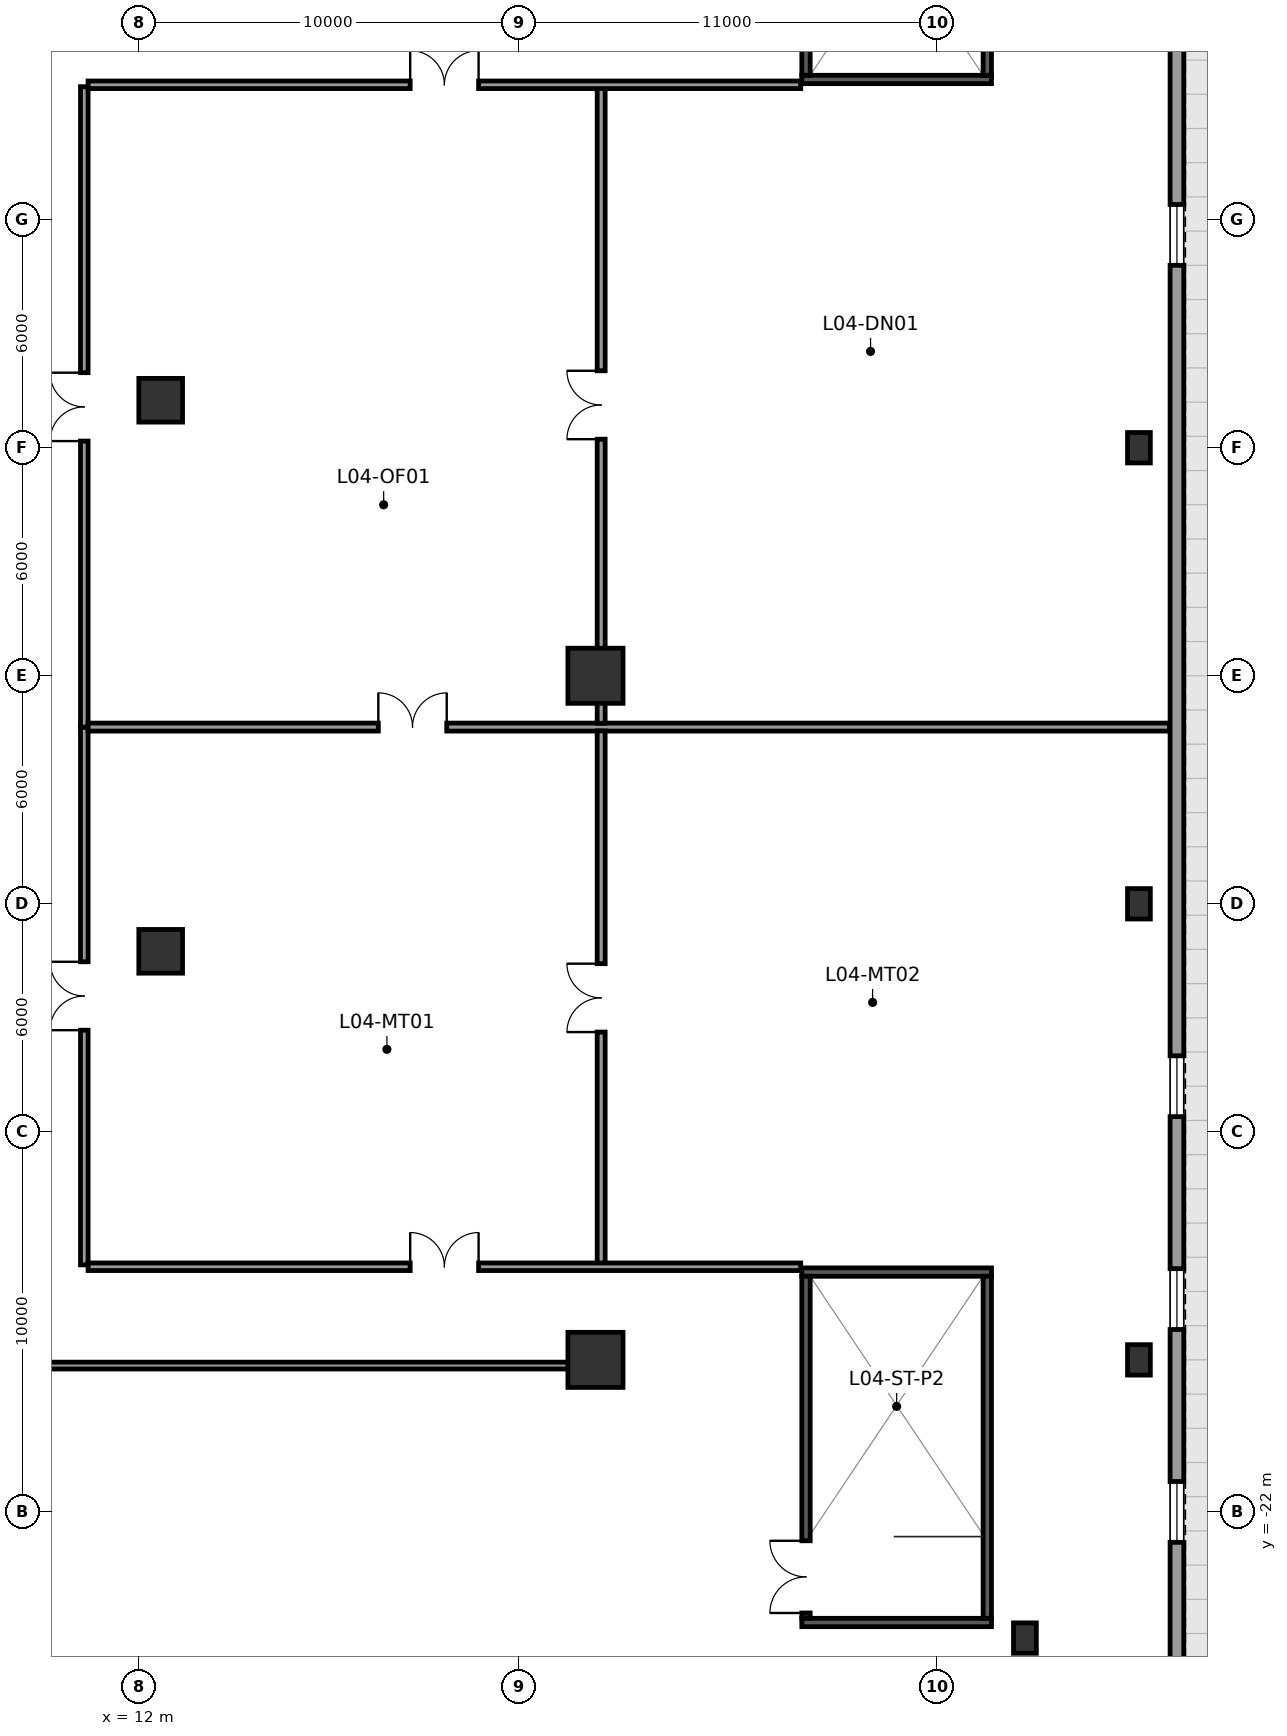
"""IFC4 building model, lengths in metres.
Left out: names, types, materials, properties, quantities, classifications, styles, units other than length and angle.
Written with IfcOpenShell. Run it as: python <this file> out.ifc"""

import sys

from ifc_helpers import new_model, si_unit, direction, frame, frame_2d, origin, origin_2d, place, context, subcontext, project, spatial, rectangle, hollow_rectangle, extrude, element, fill, save


model = new_model("IFC4")
c1 = context("Model", 3, precision=1e-05, world=origin(), true_north=direction((0.0, 1.0)))
c2 = subcontext(c1, "Body", "Model", "MODEL_VIEW")
j1 = project(units=[si_unit("LENGTHUNIT", "METRE"), si_unit("PLANEANGLEUNIT", "RADIAN")], contexts=[c1])
p1 = place(None, origin())
s1 = spatial("IfcSite", under=j1, at=p1, CompositionType="ELEMENT")
p2 = place(p1, origin())
s2 = spatial("IfcBuilding", under=s1, at=p2, CompositionType="ELEMENT")
p3 = place(p2, frame((0.0, 0.0, 23.5)))
s3 = spatial("IfcBuildingStorey", under=s2, at=p3, CompositionType="ELEMENT", Elevation=23.5)
for number, where, z_axis, x_axis in (
    (1, (12.56, -7.25, 0.0), (0.0, 0.0, 1.0), (1.0, 0.0, 0.0)),
    (2, (12.56, 7.25, 0.0), (0.0, 0.0, 1.0), (1.0, 0.0, 0.0)),
):
    element("IfcColumn", number, at=place(p3, frame(where, z_axis=z_axis, x_axis=x_axis)), inside=s3, PredefinedType="COLUMN", context=c2, shape_type="SweptSolid", body=[
        extrude(rectangle(XDim=1.15, YDim=1.15, at=origin_2d()), origin(), (0.0, 0.0, 1.0), 5.5),
    ])
for number, where, z_axis, x_axis in (
    (3, (24.0, -18.0, 0.0), (0.0, 0.0, 1.0), (1.0, 0.0, 0.0)),
    (4, (24.0, 0.0, 0.0), (0.0, 0.0, 1.0), (1.0, 0.0, 0.0)),
):
    element("IfcColumn", number, at=place(p3, frame(where, z_axis=z_axis, x_axis=x_axis)), inside=s3, PredefinedType="COLUMN", context=c2, shape_type="SweptSolid", body=[
        extrude(rectangle(XDim=1.45, YDim=1.45, at=origin_2d()), origin(), (0.0, 0.0, 1.0), 5.5),
    ])
for number, where, z_axis, x_axis in (
    (5, (38.3, -18.0, 0.0), (0.0, 0.0, 1.0), (1.0, 0.0, 0.0)),
    (6, (38.3, -6.0, 0.0), (0.0, 0.0, 1.0), (1.0, 0.0, 0.0)),
    (7, (38.3, 6.0, 0.0), (0.0, 0.0, 1.0), (1.0, 0.0, 0.0)),
):
    element("IfcColumn", number, at=place(p3, frame(where, z_axis=z_axis, x_axis=x_axis)), inside=s3, PredefinedType="COLUMN", context=c2, shape_type="SweptSolid", body=[
        extrude(hollow_rectangle(XDim=0.6, YDim=0.8, WallThickness=0.05, at=origin_2d()), origin(), (0.0, 0.0, 1.0), 5.5),
    ])
p4 = place(p3, frame((35.3, -25.32, 0.0), z_axis=(0.0, 0.0, 1.0), x_axis=(1.0, 0.0, 0.0)))
e8 = element("IfcColumn", 8, at=p4, inside=s3, PredefinedType="COLUMN", context=c2, shape_type="SweptSolid", body=[
    extrude(hollow_rectangle(XDim=0.6, YDim=0.8, WallThickness=0.05, at=origin_2d()), origin(), (0.0, 0.0, 1.0), 5.15),
])
p5 = place(p3, frame((39.3, 28.4, 0.0), z_axis=(0.0, 0.0, 1.0), x_axis=(0.0, -1.0, 0.0)))
e9 = element("IfcWall", 9, at=p5, inside=s3, PredefinedType="STANDARD", context=c2, shape_type="SweptSolid", body=[
    extrude(rectangle(XDim=56.8, YDim=0.36, at=frame_2d((28.4, 0.0))), origin(), (0.0, 0.0, 1.0), 5.15),
])
p6 = place(p5, frame((4.8, 0.0, 0.9)))
e10 = element("IfcOpeningElement", 10, at=p6, cuts=e9, PredefinedType="OPENING", context=c2, shape_type="SweptSolid", body=[
    extrude(rectangle(XDim=1.6, YDim=2.6, at=frame_2d((0.8, 1.3))), frame((0.0, 0.19, 0.0), z_axis=(0.0, -1.0, 0.0), x_axis=(1.0, 0.0, 0.0)), (0.0, 0.0, 1.0), 0.38),
])
p7 = place(p5, frame((16.0, 0.0, 0.9)))
e11 = element("IfcOpeningElement", 11, at=p7, cuts=e9, PredefinedType="OPENING", context=c2, shape_type="SweptSolid", body=[
    extrude(rectangle(XDim=1.6, YDim=2.6, at=frame_2d((0.8, 1.3))), frame((0.0, 0.19, 0.0), z_axis=(0.0, -1.0, 0.0), x_axis=(1.0, 0.0, 0.0)), (0.0, 0.0, 1.0), 0.38),
])
p8 = place(p5, frame((38.4, 0.0, 0.9)))
e12 = element("IfcOpeningElement", 12, at=p8, cuts=e9, PredefinedType="OPENING", context=c2, shape_type="SweptSolid", body=[
    extrude(rectangle(XDim=1.6, YDim=2.6, at=frame_2d((0.8, 1.3))), frame((0.0, 0.19, 0.0), z_axis=(0.0, -1.0, 0.0), x_axis=(1.0, 0.0, 0.0)), (0.0, 0.0, 1.0), 0.38),
])
p9 = place(p5, frame((44.0, 0.0, 0.9)))
e13 = element("IfcOpeningElement", 13, at=p9, cuts=e9, PredefinedType="OPENING", context=c2, shape_type="SweptSolid", body=[
    extrude(rectangle(XDim=1.6, YDim=2.6, at=frame_2d((0.8, 1.3))), frame((0.0, 0.19, 0.0), z_axis=(0.0, -1.0, 0.0), x_axis=(1.0, 0.0, 0.0)), (0.0, 0.0, 1.0), 0.38),
])
p10 = place(p5, frame((49.6, 0.0, 0.9)))
e14 = element("IfcOpeningElement", 14, at=p10, cuts=e9, PredefinedType="OPENING", context=c2, shape_type="SweptSolid", body=[
    extrude(rectangle(XDim=1.6, YDim=2.6, at=frame_2d((0.8, 1.3))), frame((0.0, 0.19, 0.0), z_axis=(0.0, -1.0, 0.0), x_axis=(1.0, 0.0, 0.0)), (0.0, 0.0, 1.0), 0.38),
])
for number, where, z_axis, x_axis in (
    (15, (29.43, -24.91, 0.0), (0.0, 0.0, 1.0), (1.0, 0.0, 0.0)),
    (16, (29.43, -15.69, 0.0), (0.0, 0.0, 1.0), (1.0, 0.0, 0.0)),
):
    element("IfcWall", number, at=place(p3, frame(where, z_axis=z_axis, x_axis=x_axis)), inside=s3, PredefinedType="SHEAR", context=c2, shape_type="SweptSolid", body=[
        extrude(rectangle(XDim=4.99, YDim=0.22, at=frame_2d((2.495, 0.0))), origin(), (0.0, 0.0, 1.0), 5.15),
    ])
p11 = place(p3, frame((29.54, -24.8, 0.0), z_axis=(0.0, 0.0, 1.0), x_axis=(0.0, 1.0, 0.0)))
e17 = element("IfcWall", 17, at=p11, inside=s3, PredefinedType="SHEAR", context=c2, shape_type="SweptSolid", body=[
    extrude(rectangle(XDim=9.0, YDim=0.22, at=frame_2d((4.5, 0.0))), origin(), (0.0, 0.0, 1.0), 5.15),
])
p12 = place(p11, frame((0.14, 0.0, 0.0)))
e18 = element("IfcOpeningElement", 18, at=p12, cuts=e17, PredefinedType="OPENING", context=c2, shape_type="SweptSolid", body=[
    extrude(rectangle(XDim=1.9, YDim=2.2, at=frame_2d((0.95, 1.1))), frame((0.0, 0.12, 0.0), z_axis=(0.0, -1.0, 0.0), x_axis=(1.0, 0.0, 0.0)), (0.0, 0.0, 1.0), 0.24),
])
p13 = place(p3, frame((34.31, -24.8, 0.0), z_axis=(0.0, 0.0, 1.0), x_axis=(0.0, 1.0, 0.0)))
e19 = element("IfcWall", 19, at=p13, inside=s3, PredefinedType="SHEAR", context=c2, shape_type="SweptSolid", body=[
    extrude(rectangle(XDim=9.0, YDim=0.22, at=frame_2d((4.5, 0.0))), origin(), (0.0, 0.0, 1.0), 5.15),
])
p14 = place(p3, frame((29.43, 15.69, 0.0), z_axis=(0.0, 0.0, 1.0), x_axis=(1.0, 0.0, 0.0)))
e20 = element("IfcWall", 20, at=p14, inside=s3, PredefinedType="SHEAR", context=c2, shape_type="SweptSolid", body=[
    extrude(rectangle(XDim=4.99, YDim=0.22, at=frame_2d((2.495, 0.0))), origin(), (0.0, 0.0, 1.0), 5.15),
])
p15 = place(p3, frame((29.54, 15.8, 0.0), z_axis=(0.0, 0.0, 1.0), x_axis=(0.0, 1.0, 0.0)))
e21 = element("IfcWall", 21, at=p15, inside=s3, PredefinedType="SHEAR", context=c2, shape_type="SweptSolid", body=[
    extrude(rectangle(XDim=9.0, YDim=0.22, at=frame_2d((4.5, 0.0))), origin(), (0.0, 0.0, 1.0), 5.15),
])
p16 = place(p15, frame((6.96, 0.0, 0.0)))
e22 = element("IfcOpeningElement", 22, at=p16, cuts=e21, PredefinedType="OPENING", context=c2, shape_type="SweptSolid", body=[
    extrude(rectangle(XDim=1.9, YDim=2.2, at=frame_2d((0.95, 1.1))), frame((0.0, 0.12, 0.0), z_axis=(0.0, -1.0, 0.0), x_axis=(1.0, 0.0, 0.0)), (0.0, 0.0, 1.0), 0.24),
])
p17 = place(p3, frame((34.31, 15.8, 0.0), z_axis=(0.0, 0.0, 1.0), x_axis=(0.0, 1.0, 0.0)))
e23 = element("IfcWall", 23, at=p17, inside=s3, PredefinedType="SHEAR", context=c2, shape_type="SweptSolid", body=[
    extrude(rectangle(XDim=9.0, YDim=0.22, at=frame_2d((4.5, 0.0))), origin(), (0.0, 0.0, 1.0), 5.15),
])
p18 = place(p3, frame((10.55, -15.5, 0.0), z_axis=(0.0, 0.0, 1.0), x_axis=(0.0, 1.0, 0.0)))
e24 = element("IfcWall", 24, at=p18, inside=s3, PredefinedType="PARTITIONING", context=c2, shape_type="SweptSolid", body=[
    extrude(rectangle(XDim=14.15, YDim=0.2, at=frame_2d((7.075, 0.0))), origin(), (0.0, 0.0, 1.0), 5.15),
])
p19 = place(p18, frame((6.175, 0.0, 0.0)))
e25 = element("IfcOpeningElement", 25, at=p19, cuts=e24, PredefinedType="OPENING", context=c2, shape_type="SweptSolid", body=[
    extrude(rectangle(XDim=1.8, YDim=2.2, at=frame_2d((0.9, 1.1))), frame((0.0, 0.11, 0.0), z_axis=(0.0, -1.0, 0.0), x_axis=(1.0, 0.0, 0.0)), (0.0, 0.0, 1.0), 0.22),
])
p20 = place(p3, frame((10.55, -1.35, 0.0), z_axis=(0.0, 0.0, 1.0), x_axis=(0.0, 1.0, 0.0)))
e26 = element("IfcWall", 26, at=p20, inside=s3, PredefinedType="PARTITIONING", context=c2, shape_type="SweptSolid", body=[
    extrude(rectangle(XDim=16.85, YDim=0.2, at=frame_2d((8.425, 0.0))), origin(), (0.0, 0.0, 1.0), 5.15),
])
p21 = place(p20, frame((7.525, 0.0, 0.0)))
e27 = element("IfcOpeningElement", 27, at=p21, cuts=e26, PredefinedType="OPENING", context=c2, shape_type="SweptSolid", body=[
    extrude(rectangle(XDim=1.8, YDim=2.2, at=frame_2d((0.9, 1.1))), frame((0.0, 0.11, 0.0), z_axis=(0.0, -1.0, 0.0), x_axis=(1.0, 0.0, 0.0)), (0.0, 0.0, 1.0), 0.22),
])
p22 = place(p3, frame((10.65, -1.35, 0.0), z_axis=(0.0, 0.0, 1.0), x_axis=(1.0, 0.0, 0.0)))
e28 = element("IfcWall", 28, at=p22, inside=s3, PredefinedType="MOVABLE", context=c2, shape_type="SweptSolid", body=[
    extrude(rectangle(XDim=28.455, YDim=0.21, at=frame_2d((14.228, 0.0))), origin(), (0.0, 0.0, 1.0), 5.15),
])
p23 = place(p22, frame((7.636, 0.0, 0.0)))
e29 = element("IfcOpeningElement", 29, at=p23, cuts=e28, PredefinedType="OPENING", context=c2, shape_type="SweptSolid", body=[
    extrude(rectangle(XDim=1.8, YDim=2.2, at=frame_2d((0.9, 1.1))), frame((0.0, 0.115, 0.0), z_axis=(0.0, -1.0, 0.0), x_axis=(1.0, 0.0, 0.0)), (0.0, 0.0, 1.0), 0.23),
])
p24 = place(p3, frame((24.15, -15.5, 0.0), z_axis=(0.0, 0.0, 1.0), x_axis=(0.0, 1.0, 0.0)))
e30 = element("IfcWall", 30, at=p24, inside=s3, PredefinedType="MOVABLE", context=c2, shape_type="SweptSolid", body=[
    extrude(rectangle(XDim=14.05, YDim=0.21, at=frame_2d((7.025, 0.0))), origin(), (0.0, 0.0, 1.0), 3.33),
])
p25 = place(p24, frame((6.125, 0.0, 0.0)))
e31 = element("IfcOpeningElement", 31, at=p25, cuts=e30, PredefinedType="OPENING", context=c2, shape_type="SweptSolid", body=[
    extrude(rectangle(XDim=1.8, YDim=2.2, at=frame_2d((0.9, 1.1))), frame((0.0, 0.115, 0.0), z_axis=(0.0, -1.0, 0.0), x_axis=(1.0, 0.0, 0.0)), (0.0, 0.0, 1.0), 0.23),
])
p26 = place(p3, frame((24.15, -1.25, 0.0), z_axis=(0.0, 0.0, 1.0), x_axis=(0.0, 1.0, 0.0)))
e32 = element("IfcWall", 32, at=p26, inside=s3, PredefinedType="MOVABLE", context=c2, shape_type="SweptSolid", body=[
    extrude(rectangle(XDim=16.75, YDim=0.21, at=frame_2d((8.375, 0.0))), origin(), (0.0, 0.0, 1.0), 3.33),
])
p27 = place(p26, frame((7.475, 0.0, 0.0)))
e33 = element("IfcOpeningElement", 33, at=p27, cuts=e32, PredefinedType="OPENING", context=c2, shape_type="SweptSolid", body=[
    extrude(rectangle(XDim=1.8, YDim=2.2, at=frame_2d((0.9, 1.1))), frame((0.0, 0.115, 0.0), z_axis=(0.0, -1.0, 0.0), x_axis=(1.0, 0.0, 0.0)), (0.0, 0.0, 1.0), 0.23),
])
p28 = place(p3, frame((10.65, 15.55, 0.0), z_axis=(0.0, 0.0, 1.0), x_axis=(1.0, 0.0, 0.0)))
e34 = element("IfcWall", 34, at=p28, inside=s3, PredefinedType="PARTITIONING", context=c2, shape_type="SweptSolid", body=[
    extrude(rectangle(XDim=18.75, YDim=0.2, at=frame_2d((9.375, 0.0))), origin(), (0.0, 0.0, 1.0), 5.15),
])
p29 = place(p28, frame((8.475, 0.0, 0.0)))
e35 = element("IfcOpeningElement", 35, at=p29, cuts=e34, PredefinedType="OPENING", context=c2, shape_type="SweptSolid", body=[
    extrude(rectangle(XDim=1.8, YDim=2.2, at=frame_2d((0.9, 1.1))), frame((0.0, 0.11, 0.0), z_axis=(0.0, -1.0, 0.0), x_axis=(1.0, 0.0, 0.0)), (0.0, 0.0, 1.0), 0.22),
])
p30 = place(p3, frame((10.65, -15.55, 0.0), z_axis=(0.0, 0.0, 1.0), x_axis=(1.0, 0.0, 0.0)))
e36 = element("IfcWall", 36, at=p30, inside=s3, PredefinedType="PARTITIONING", context=c2, shape_type="SweptSolid", body=[
    extrude(rectangle(XDim=18.75, YDim=0.2, at=frame_2d((9.375, 0.0))), origin(), (0.0, 0.0, 1.0), 5.15),
])
p31 = place(p30, frame((8.475, 0.0, 0.0)))
e37 = element("IfcOpeningElement", 37, at=p31, cuts=e36, PredefinedType="OPENING", context=c2, shape_type="SweptSolid", body=[
    extrude(rectangle(XDim=1.8, YDim=2.2, at=frame_2d((0.9, 1.1))), frame((0.0, 0.11, 0.0), z_axis=(0.0, -1.0, 0.0), x_axis=(1.0, 0.0, 0.0)), (0.0, 0.0, 1.0), 0.22),
])
p32 = place(p3, frame((-23.6, -18.15, 0.0), z_axis=(0.0, 0.0, 1.0), x_axis=(1.0, 0.0, 0.0)))
e38 = element("IfcWall", 38, at=p32, inside=s3, PredefinedType="PARTITIONING", context=c2, shape_type="SweptSolid", body=[
    extrude(rectangle(XDim=47.2, YDim=0.18, at=frame_2d((23.6, 0.0))), origin(), (0.0, 0.0, 1.0), 3.33),
])
p33 = place(p32, frame((13.26, 0.0, 0.0)))
e39 = element("IfcOpeningElement", 39, at=p33, cuts=e38, PredefinedType="OPENING", context=c2, shape_type="SweptSolid", body=[
    extrude(rectangle(XDim=1.8, YDim=2.2, at=frame_2d((0.9, 1.1))), frame((0.0, 0.1, 0.0), z_axis=(0.0, -1.0, 0.0), x_axis=(1.0, 0.0, 0.0)), (0.0, 0.0, 1.0), 0.2),
])
p34 = place(p7, origin())
e40 = element("IfcWindow", 40, at=p34, inside=s3, PartitioningType="DOUBLE_PANEL_VERTICAL", PredefinedType="WINDOW", context=c2, shape_type="SweptSolid", body=[
    extrude(rectangle(XDim=1.6, YDim=2.6, at=frame_2d((0.8, 1.3))), frame((0.0, 0.03, 0.0), z_axis=(0.0, -1.0, 0.0), x_axis=(1.0, 0.0, 0.0)), (0.0, 0.0, 1.0), 0.06),
])
fill(e11, e40)
p35 = place(p8, origin())
e41 = element("IfcWindow", 41, at=p35, inside=s3, PartitioningType="DOUBLE_PANEL_VERTICAL", PredefinedType="WINDOW", context=c2, shape_type="SweptSolid", body=[
    extrude(rectangle(XDim=1.6, YDim=2.6, at=frame_2d((0.8, 1.3))), frame((0.0, 0.03, 0.0), z_axis=(0.0, -1.0, 0.0), x_axis=(1.0, 0.0, 0.0)), (0.0, 0.0, 1.0), 0.06),
])
fill(e12, e41)
p36 = place(p9, origin())
e42 = element("IfcWindow", 42, at=p36, inside=s3, PartitioningType="DOUBLE_PANEL_VERTICAL", PredefinedType="WINDOW", context=c2, shape_type="SweptSolid", body=[
    extrude(rectangle(XDim=1.6, YDim=2.6, at=frame_2d((0.8, 1.3))), frame((0.0, 0.03, 0.0), z_axis=(0.0, -1.0, 0.0), x_axis=(1.0, 0.0, 0.0)), (0.0, 0.0, 1.0), 0.06),
])
fill(e13, e42)
p37 = place(p10, origin())
e43 = element("IfcWindow", 43, at=p37, inside=s3, PartitioningType="DOUBLE_PANEL_VERTICAL", PredefinedType="WINDOW", context=c2, shape_type="SweptSolid", body=[
    extrude(rectangle(XDim=1.6, YDim=2.6, at=frame_2d((0.8, 1.3))), frame((0.0, 0.03, 0.0), z_axis=(0.0, -1.0, 0.0), x_axis=(1.0, 0.0, 0.0)), (0.0, 0.0, 1.0), 0.06),
])
fill(e14, e43)
p38 = place(p12, origin())
e44 = element("IfcDoor", 44, at=p38, inside=s3, OperationType="DOUBLE_DOOR_SINGLE_SWING", PredefinedType="DOOR", context=c2, shape_type="SweptSolid", body=[
    extrude(rectangle(XDim=1.9, YDim=2.2, at=frame_2d((0.95, 1.1))), frame((0.0, 0.025, 0.0), z_axis=(0.0, -1.0, 0.0), x_axis=(1.0, 0.0, 0.0)), (0.0, 0.0, 1.0), 0.05),
])
fill(e18, e44)
p39 = place(p19, origin())
e45 = element("IfcDoor", 45, at=p39, inside=s3, OperationType="DOUBLE_DOOR_SINGLE_SWING", PredefinedType="DOOR", context=c2, shape_type="SweptSolid", body=[
    extrude(rectangle(XDim=1.8, YDim=2.2, at=frame_2d((0.9, 1.1))), frame((0.0, 0.025, 0.0), z_axis=(0.0, -1.0, 0.0), x_axis=(1.0, 0.0, 0.0)), (0.0, 0.0, 1.0), 0.05),
])
fill(e25, e45)
p40 = place(p21, origin())
e46 = element("IfcDoor", 46, at=p40, inside=s3, OperationType="DOUBLE_DOOR_SINGLE_SWING", PredefinedType="DOOR", context=c2, shape_type="SweptSolid", body=[
    extrude(rectangle(XDim=1.8, YDim=2.2, at=frame_2d((0.9, 1.1))), frame((0.0, 0.025, 0.0), z_axis=(0.0, -1.0, 0.0), x_axis=(1.0, 0.0, 0.0)), (0.0, 0.0, 1.0), 0.05),
])
fill(e27, e46)
p41 = place(p23, origin())
e47 = element("IfcDoor", 47, at=p41, inside=s3, OperationType="DOUBLE_DOOR_SINGLE_SWING", PredefinedType="DOOR", context=c2, shape_type="SweptSolid", body=[
    extrude(rectangle(XDim=1.8, YDim=2.2, at=frame_2d((0.9, 1.1))), frame((0.0, 0.025, 0.0), z_axis=(0.0, -1.0, 0.0), x_axis=(1.0, 0.0, 0.0)), (0.0, 0.0, 1.0), 0.05),
])
fill(e29, e47)
p42 = place(p25, origin())
e48 = element("IfcDoor", 48, at=p42, inside=s3, OperationType="DOUBLE_DOOR_SINGLE_SWING", PredefinedType="DOOR", context=c2, shape_type="SweptSolid", body=[
    extrude(rectangle(XDim=1.8, YDim=2.2, at=frame_2d((0.9, 1.1))), frame((0.0, 0.025, 0.0), z_axis=(0.0, -1.0, 0.0), x_axis=(1.0, 0.0, 0.0)), (0.0, 0.0, 1.0), 0.05),
])
fill(e31, e48)
p43 = place(p27, origin())
e49 = element("IfcDoor", 49, at=p43, inside=s3, OperationType="DOUBLE_DOOR_SINGLE_SWING", PredefinedType="DOOR", context=c2, shape_type="SweptSolid", body=[
    extrude(rectangle(XDim=1.8, YDim=2.2, at=frame_2d((0.9, 1.1))), frame((0.0, 0.025, 0.0), z_axis=(0.0, -1.0, 0.0), x_axis=(1.0, 0.0, 0.0)), (0.0, 0.0, 1.0), 0.05),
])
fill(e33, e49)
p44 = place(p29, origin())
e50 = element("IfcDoor", 50, at=p44, inside=s3, OperationType="DOUBLE_DOOR_SINGLE_SWING", PredefinedType="DOOR", context=c2, shape_type="SweptSolid", body=[
    extrude(rectangle(XDim=1.8, YDim=2.2, at=frame_2d((0.9, 1.1))), frame((0.0, 0.025, 0.0), z_axis=(0.0, -1.0, 0.0), x_axis=(1.0, 0.0, 0.0)), (0.0, 0.0, 1.0), 0.05),
])
fill(e35, e50)
p45 = place(p31, origin())
e51 = element("IfcDoor", 51, at=p45, inside=s3, OperationType="DOUBLE_DOOR_SINGLE_SWING", PredefinedType="DOOR", context=c2, shape_type="SweptSolid", body=[
    extrude(rectangle(XDim=1.8, YDim=2.2, at=frame_2d((0.9, 1.1))), frame((0.0, 0.025, 0.0), z_axis=(0.0, -1.0, 0.0), x_axis=(1.0, 0.0, 0.0)), (0.0, 0.0, 1.0), 0.05),
])
fill(e37, e51)
save(model, sys.argv[1])
